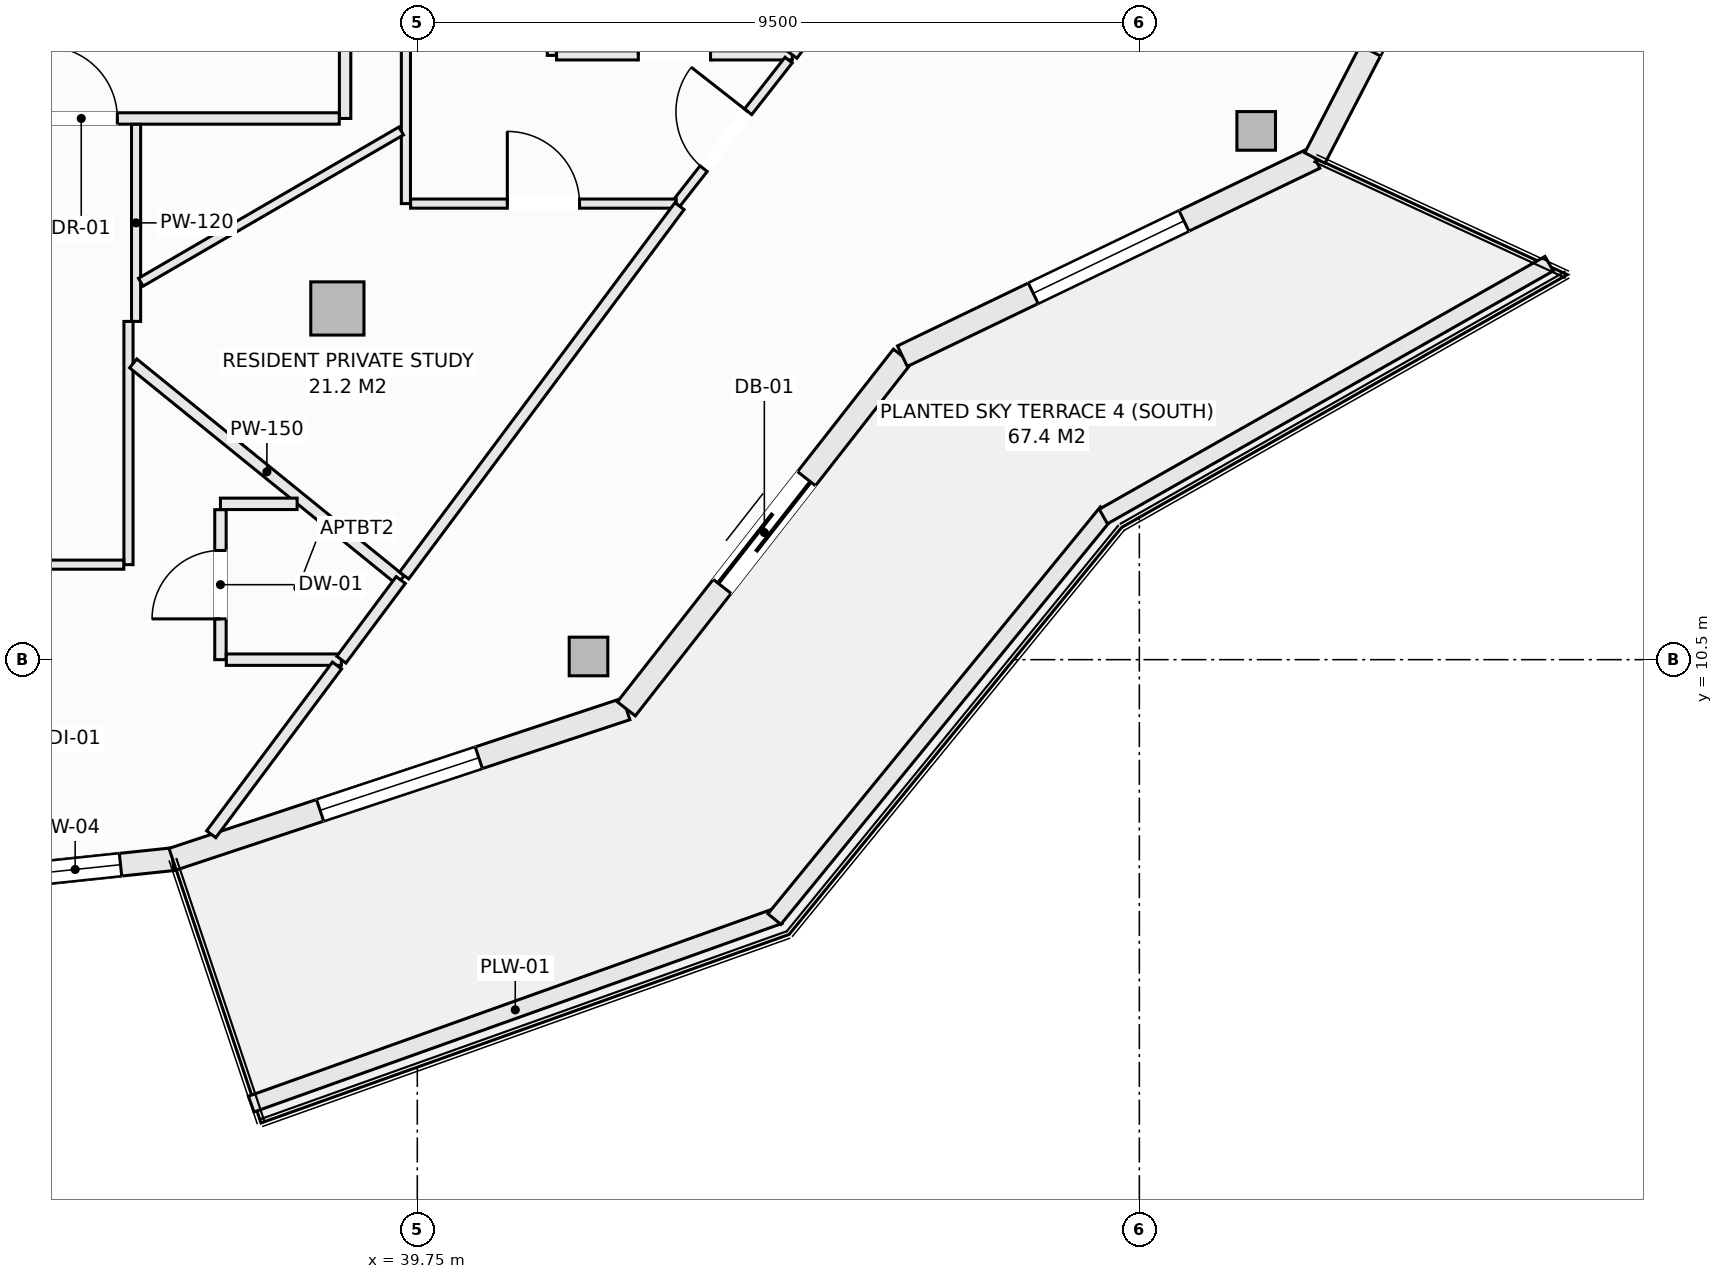
"""IFC4 building model, lengths in metres.
Left out: names, types, materials, properties, quantities, classifications, styles, units other than length and angle.
Written with IfcOpenShell. Run it as: python <this file> out.ifc"""

import sys

from ifc_helpers import new_model, si_unit, direction, frame, frame_2d, origin, origin_2d, place, context, subcontext, project, spatial, rectangle, hollow_rectangle, extrude, element, fill, save


model = new_model("IFC4")
c1 = context("Model", 3, precision=1e-05, world=origin(), true_north=direction((0.0, 1.0)))
c2 = subcontext(c1, "Body", "Model", "MODEL_VIEW")
j1 = project(units=[si_unit("LENGTHUNIT", "METRE"), si_unit("PLANEANGLEUNIT", "RADIAN")], contexts=[c1])
p1 = place(None, origin())
s1 = spatial("IfcSite", under=j1, at=p1, CompositionType="ELEMENT")
p2 = place(p1, origin())
s2 = spatial("IfcBuilding", under=s1, at=p2, CompositionType="ELEMENT")
p3 = place(p2, frame((0.0, 0.0, 199.7)))
s3 = spatial("IfcBuildingStorey", under=s2, at=p3, CompositionType="ELEMENT", Elevation=199.7)
for number, where, z_axis, x_axis in (
    (1, (42.003, 10.542, -0.27), (0.0, 0.0, 1.0), (1.0, 0.0, 0.0)),
    (2, (50.787, 17.456, -0.27), (0.0, 0.0, 1.0), (1.0, 0.0, 0.0)),
):
    element("IfcColumn", number, at=place(p3, frame(where, z_axis=z_axis, x_axis=x_axis)), inside=s3, PredefinedType="COLUMN", context=c2, shape_type="SweptSolid", body=[
        extrude(hollow_rectangle(XDim=0.508, YDim=0.508, WallThickness=0.019, at=origin_2d()), origin(), (0.0, 0.0, 1.0), 3.3),
    ])
p4 = place(p3, frame((38.698, 15.121, -0.27), z_axis=(0.0, 0.0, 1.0), x_axis=(1.0, 0.0, 0.0)))
e3 = element("IfcColumn", 3, at=p4, inside=s3, PredefinedType="COLUMN", context=c2, shape_type="SweptSolid", body=[
    extrude(rectangle(XDim=0.7, YDim=0.7, at=origin_2d()), origin(), (0.0, 0.0, 1.0), 3.3),
])
p5 = place(p3, frame((30.125, 7.2, 0.0), z_axis=(0.0, 0.0, 1.0), x_axis=(0.994497142298, 0.104763705363, 0.0)))
e4 = element("IfcWall", 4, at=p5, inside=s3, PredefinedType="SOLIDWALL", context=c2, shape_type="SweptSolid", body=[
    extrude(rectangle(XDim=6.441, YDim=0.3, at=frame_2d((3.221, 0.0))), origin(), (0.0, 0.0, 1.0), 2.605),
])
p6 = place(p5, frame((3.085, 0.0, 0.72)))
e5 = element("IfcOpeningElement", 5, at=p6, cuts=e4, PredefinedType="OPENING", context=c2, shape_type="SweptSolid", body=[
    extrude(rectangle(XDim=1.2, YDim=1.65, at=frame_2d((0.6, 0.825))), frame((0.0, 0.16, 0.0), z_axis=(0.0, -1.0, 0.0), x_axis=(1.0, 0.0, 0.0)), (0.0, 0.0, 1.0), 0.32),
])
p7 = place(p5, frame((4.552, 0.0, 0.72)))
e6 = element("IfcOpeningElement", 6, at=p7, cuts=e4, PredefinedType="OPENING", context=c2, shape_type="SweptSolid", body=[
    extrude(rectangle(XDim=1.2, YDim=1.65, at=frame_2d((0.6, 0.825))), frame((0.0, 0.16, 0.0), z_axis=(0.0, -1.0, 0.0), x_axis=(1.0, 0.0, 0.0)), (0.0, 0.0, 1.0), 0.32),
])
p8 = place(p3, frame((36.531, 7.875, 0.0), z_axis=(0.0, 0.0, 1.0), x_axis=(0.949240877604, 0.314550085495, 0.0)))
e7 = element("IfcWall", 7, at=p8, inside=s3, PredefinedType="SOLIDWALL", context=c2, shape_type="SweptSolid", body=[
    extrude(rectangle(XDim=6.288, YDim=0.3, at=frame_2d((3.144, 0.0))), origin(), (0.0, 0.0, 1.0), 2.605),
])
p9 = place(p8, frame((2.044, 0.0, 0.72)))
e8 = element("IfcOpeningElement", 8, at=p9, cuts=e7, PredefinedType="OPENING", context=c2, shape_type="SweptSolid", body=[
    extrude(rectangle(XDim=2.2, YDim=1.65, at=frame_2d((1.1, 0.825))), frame((0.0, 0.16, 0.0), z_axis=(0.0, -1.0, 0.0), x_axis=(1.0, 0.0, 0.0)), (0.0, 0.0, 1.0), 0.32),
])
p10 = place(p3, frame((42.5, 9.853, 0.0), z_axis=(0.0, 0.0, 1.0), x_axis=(0.616450126935, 0.787393955401, 0.0)))
e9 = element("IfcWall", 9, at=p10, inside=s3, PredefinedType="SOLIDWALL", context=c2, shape_type="SweptSolid", body=[
    extrude(rectangle(XDim=5.893, YDim=0.3, at=frame_2d((2.946, 0.0))), origin(), (0.0, 0.0, 1.0), 2.605),
])
p11 = place(p10, frame((2.046, 0.0, 0.0)))
e10 = element("IfcOpeningElement", 10, at=p11, cuts=e9, PredefinedType="OPENING", context=c2, shape_type="SweptSolid", body=[
    extrude(rectangle(XDim=1.8, YDim=2.25, at=frame_2d((0.9, 1.125))), frame((0.0, 0.16, 0.0), z_axis=(0.0, -1.0, 0.0), x_axis=(1.0, 0.0, 0.0)), (0.0, 0.0, 1.0), 0.32),
])
p12 = place(p3, frame((46.133, 14.493, 0.0), z_axis=(0.0, 0.0, 1.0), x_axis=(0.901348331142, 0.433094892545, 0.0)))
e11 = element("IfcWall", 11, at=p12, inside=s3, PredefinedType="SOLIDWALL", context=c2, shape_type="SweptSolid", body=[
    extrude(rectangle(XDim=6.021, YDim=0.3, at=frame_2d((3.01, 0.0))), origin(), (0.0, 0.0, 1.0), 2.605),
])
p13 = place(p12, frame((1.91, 0.0, 0.72)))
e12 = element("IfcOpeningElement", 12, at=p13, cuts=e11, PredefinedType="OPENING", context=c2, shape_type="SweptSolid", body=[
    extrude(rectangle(XDim=2.2, YDim=1.65, at=frame_2d((1.1, 0.825))), frame((0.0, 0.16, 0.0), z_axis=(0.0, -1.0, 0.0), x_axis=(1.0, 0.0, 0.0)), (0.0, 0.0, 1.0), 0.32),
])
p14 = place(p3, frame((51.559, 17.1, 0.0), z_axis=(0.0, 0.0, 1.0), x_axis=(0.459808219482, 0.888018243786, 0.0)))
e13 = element("IfcWall", 13, at=p14, inside=s3, PredefinedType="SOLIDWALL", context=c2, shape_type="SweptSolid", body=[
    extrude(rectangle(XDim=5.378, YDim=0.3, at=frame_2d((2.689, 0.0))), origin(), (0.0, 0.0, 1.0), 2.605),
])
p15 = place(p14, frame((1.589, 0.0, 0.72)))
e14 = element("IfcOpeningElement", 14, at=p15, cuts=e13, PredefinedType="OPENING", context=c2, shape_type="SweptSolid", body=[
    extrude(rectangle(XDim=2.2, YDim=1.65, at=frame_2d((1.1, 0.825))), frame((0.0, 0.16, 0.0), z_axis=(0.0, -1.0, 0.0), x_axis=(1.0, 0.0, 0.0)), (0.0, 0.0, 1.0), 0.32),
])
p16 = place(p3, frame((37.565, 4.653, 0.0), z_axis=(0.0, 0.0, 1.0), x_axis=(0.941780086523, 0.336229488042, 0.0)))
e15 = element("IfcWall", 15, at=p16, inside=s3, PredefinedType="PARAPET", context=c2, shape_type="SweptSolid", body=[
    extrude(rectangle(XDim=7.378, YDim=0.22, at=frame_2d((3.689, 0.0))), origin(), (0.0, 0.0, 1.0), 0.52),
])
p17 = place(p3, frame((44.448, 7.087, 0.0), z_axis=(0.0, 0.0, 1.0), x_axis=(0.632697312147, 0.774399193699, 0.0)))
e16 = element("IfcWall", 16, at=p17, inside=s3, PredefinedType="PARAPET", context=c2, shape_type="SweptSolid", body=[
    extrude(rectangle(XDim=6.914, YDim=0.22, at=frame_2d((3.457, 0.0))), origin(), (0.0, 0.0, 1.0), 0.52),
])
p18 = place(p3, frame((48.776, 12.383, 0.0), z_axis=(0.0, 0.0, 1.0), x_axis=(0.869860619267, 0.493297580623, 0.0)))
e17 = element("IfcWall", 17, at=p18, inside=s3, PredefinedType="PARAPET", context=c2, shape_type="SweptSolid", body=[
    extrude(rectangle(XDim=6.743, YDim=0.22, at=frame_2d((3.371, 0.0))), origin(), (0.0, 0.0, 1.0), 0.52),
])
p19 = place(p3, frame((38.8, 17.62, 0.0), z_axis=(0.0, 0.0, 1.0), x_axis=(0.0, 1.0, 0.0)))
e18 = element("IfcWall", 18, at=p19, inside=s3, PredefinedType="PARTITIONING", context=c2, shape_type="SweptSolid", body=[
    extrude(rectangle(XDim=2.18, YDim=0.15, at=frame_2d((1.09, 0.0))), origin(), (0.0, 0.0, 1.0), 3.03),
])
p20 = place(p3, frame((34.477, 17.62, 0.0), z_axis=(0.0, 0.0, 1.0), x_axis=(1.0, 0.0, 0.0)))
e19 = element("IfcWall", 19, at=p20, inside=s3, PredefinedType="PARTITIONING", context=c2, shape_type="SweptSolid", body=[
    extrude(rectangle(XDim=4.246, YDim=0.15, at=frame_2d((2.123, 0.0))), origin(), (0.0, 0.0, 1.0), 3.03),
])
p21 = place(p20, frame((0.376, 0.0, 0.0)))
e20 = element("IfcOpeningElement", 20, at=p21, cuts=e19, PredefinedType="OPENING", context=c2, shape_type="SweptSolid", body=[
    extrude(rectangle(XDim=0.95, YDim=2.1, at=frame_2d((0.475, 1.05))), frame((0.0, 0.085, 0.0), z_axis=(0.0, -1.0, 0.0), x_axis=(1.0, 0.0, 0.0)), (0.0, 0.0, 1.0), 0.17),
])
p22 = place(p3, frame((39.6, 16.5, 0.0), z_axis=(0.0, 0.0, 1.0), x_axis=(0.0, 1.0, 0.0)))
e21 = element("IfcWall", 21, at=p22, inside=s3, PredefinedType="PARTITIONING", context=c2, shape_type="SweptSolid", body=[
    extrude(rectangle(XDim=6.52, YDim=0.12, at=frame_2d((3.26, 0.0))), origin(), (0.0, 0.0, 1.0), 2.478),
])
p23 = place(p3, frame((41.52, 18.45, 0.0), z_axis=(0.0, 0.0, 1.0), x_axis=(0.0, 1.0, 0.0)))
e22 = element("IfcWall", 22, at=p23, inside=s3, PredefinedType="PARTITIONING", context=c2, shape_type="SweptSolid", body=[
    extrude(rectangle(XDim=2.357, YDim=0.12, at=frame_2d((1.178, 0.0))), origin(), (0.0, 0.0, 1.0), 3.03),
])
p24 = place(p3, frame((41.582, 18.45, 0.0), z_axis=(0.0, 0.0, 1.0), x_axis=(1.0, 0.0, 0.0)))
e23 = element("IfcWall", 23, at=p24, inside=s3, PredefinedType="PARTITIONING", context=c2, shape_type="SweptSolid", body=[
    extrude(rectangle(XDim=3.102, YDim=0.12, at=frame_2d((1.551, 0.0))), origin(), (0.0, 0.0, 1.0), 3.03),
])
p25 = place(p24, frame((1.076, 0.0, 0.0)))
e24 = element("IfcOpeningElement", 24, at=p25, cuts=e23, PredefinedType="OPENING", context=c2, shape_type="SweptSolid", body=[
    extrude(rectangle(XDim=0.95, YDim=2.1, at=frame_2d((0.475, 1.05))), frame((0.0, 0.07, 0.0), z_axis=(0.0, -1.0, 0.0), x_axis=(1.0, 0.0, 0.0)), (0.0, 0.0, 1.0), 0.14),
])
p26 = place(p3, frame((43.157, 16.5, 0.0), z_axis=(0.0, 0.0, 1.0), x_axis=(0.616566276607, 0.787303008092, 0.0)))
e25 = element("IfcWall", 25, at=p26, inside=s3, PredefinedType="PARTITIONING", context=c2, shape_type="SweptSolid", body=[
    extrude(rectangle(XDim=2.398, YDim=0.12, at=frame_2d((1.199, 0.0))), origin(), (0.0, 0.0, 1.0), 3.03),
])
p27 = place(p26, frame((0.584, 0.0, 0.0)))
e26 = element("IfcOpeningElement", 26, at=p27, cuts=e25, PredefinedType="OPENING", context=c2, shape_type="SweptSolid", body=[
    extrude(rectangle(XDim=0.95, YDim=2.1, at=frame_2d((0.475, 1.05))), frame((0.0, 0.07, 0.0), z_axis=(0.0, -1.0, 0.0), x_axis=(1.0, 0.0, 0.0)), (0.0, 0.0, 1.0), 0.14),
])
p28 = place(p3, frame((39.662, 16.5, 0.0), z_axis=(0.0, 0.0, 1.0), x_axis=(1.0, 0.0, 0.0)))
e27 = element("IfcWall", 27, at=p28, inside=s3, PredefinedType="PARTITIONING", context=c2, shape_type="SweptSolid", body=[
    extrude(rectangle(XDim=3.495, YDim=0.12, at=frame_2d((1.748, 0.0))), origin(), (0.0, 0.0, 1.0), 2.712),
])
p29 = place(p28, frame((1.272, 0.0, 0.0)))
e28 = element("IfcOpeningElement", 28, at=p29, cuts=e27, PredefinedType="OPENING", context=c2, shape_type="SweptSolid", body=[
    extrude(rectangle(XDim=0.95, YDim=2.1, at=frame_2d((0.475, 1.05))), frame((0.0, 0.07, 0.0), z_axis=(0.0, -1.0, 0.0), x_axis=(1.0, 0.0, 0.0)), (0.0, 0.0, 1.0), 0.14),
])
p30 = place(p3, frame((36.05, 14.95, 0.0), z_axis=(0.0, 0.0, 1.0), x_axis=(0.0, 1.0, 0.0)))
e29 = element("IfcWall", 29, at=p30, inside=s3, PredefinedType="PARTITIONING", context=c2, shape_type="SweptSolid", body=[
    extrude(rectangle(XDim=2.593, YDim=0.12, at=frame_2d((1.296, 0.0))), origin(), (0.0, 0.0, 1.0), 3.03),
])
p31 = place(p3, frame((35.95, 11.75, 0.0), z_axis=(0.0, 0.0, 1.0), x_axis=(0.0, 1.0, 0.0)))
e30 = element("IfcWall", 30, at=p31, inside=s3, PredefinedType="PARTITIONING", context=c2, shape_type="SweptSolid", body=[
    extrude(rectangle(XDim=3.2, YDim=0.12, at=frame_2d((1.6, 0.0))), origin(), (0.0, 0.0, 1.0), 3.03),
])
p32 = place(p3, frame((31.766, 11.75, 0.0), z_axis=(0.0, 0.0, 1.0), x_axis=(1.0, 0.0, 0.0)))
e31 = element("IfcWall", 31, at=p32, inside=s3, PredefinedType="PARTITIONING", context=c2, shape_type="SweptSolid", body=[
    extrude(rectangle(XDim=4.122, YDim=0.12, at=frame_2d((2.061, 0.0))), origin(), (0.0, 0.0, 1.0), 3.03),
])
p33 = place(p32, frame((1.586, 0.0, 0.0)))
e32 = element("IfcOpeningElement", 32, at=p33, cuts=e31, PredefinedType="OPENING", context=c2, shape_type="SweptSolid", body=[
    extrude(rectangle(XDim=0.95, YDim=2.1, at=frame_2d((0.475, 1.05))), frame((0.0, 0.07, 0.0), z_axis=(0.0, -1.0, 0.0), x_axis=(1.0, 0.0, 0.0)), (0.0, 0.0, 1.0), 0.14),
])
p34 = place(p3, frame((36.112, 15.466, 0.0), z_axis=(0.0, 0.0, 1.0), x_axis=(0.864713842027, 0.502264841898, 0.0)))
e33 = element("IfcWall", 33, at=p34, inside=s3, PredefinedType="PARTITIONING", context=c2, shape_type="SweptSolid", body=[
    extrude(rectangle(XDim=3.962, YDim=0.12, at=frame_2d((1.981, 0.0))), origin(), (0.0, 0.0, 1.0), 2.478),
])
p35 = place(p3, frame((36.012, 14.398, 0.0), z_axis=(0.0, 0.0, 1.0), x_axis=(0.776797795694, -0.629750096947, 0.0)))
e34 = element("IfcWall", 34, at=p35, inside=s3, PredefinedType="PARTITIONING", context=c2, shape_type="SweptSolid", body=[
    extrude(rectangle(XDim=4.529, YDim=0.15, at=frame_2d((2.265, 0.0))), origin(), (0.0, 0.0, 1.0), 3.03),
])
p36 = place(p3, frame((37.16, 12.55, 0.0), z_axis=(0.0, 0.0, 1.0), x_axis=(1.0, 0.0, 0.0)))
e35 = element("IfcWall", 35, at=p36, inside=s3, PredefinedType="PARTITIONING", context=c2, shape_type="SweptSolid", body=[
    extrude(rectangle(XDim=1.009, YDim=0.15, at=frame_2d((0.504, 0.0))), origin(), (0.0, 0.0, 1.0), 3.03),
])
p37 = place(p3, frame((37.16, 10.5, 0.0), z_axis=(0.0, 0.0, 1.0), x_axis=(0.0, 1.0, 0.0)))
e36 = element("IfcWall", 36, at=p37, inside=s3, PredefinedType="PARTITIONING", context=c2, shape_type="SweptSolid", body=[
    extrude(rectangle(XDim=1.973, YDim=0.15, at=frame_2d((0.986, 0.0))), origin(), (0.0, 0.0, 1.0), 3.03),
])
p38 = place(p37, frame((0.537, 0.0, 0.0)))
e37 = element("IfcOpeningElement", 37, at=p38, cuts=e36, PredefinedType="OPENING", context=c2, shape_type="SweptSolid", body=[
    extrude(rectangle(XDim=0.9, YDim=2.1, at=frame_2d((0.45, 1.05))), frame((0.0, 0.085, 0.0), z_axis=(0.0, -1.0, 0.0), x_axis=(1.0, 0.0, 0.0)), (0.0, 0.0, 1.0), 0.17),
])
p39 = place(p3, frame((37.237, 10.5, 0.0), z_axis=(0.0, 0.0, 1.0), x_axis=(1.0, 0.0, 0.0)))
e38 = element("IfcWall", 38, at=p39, inside=s3, PredefinedType="PARTITIONING", context=c2, shape_type="SweptSolid", body=[
    extrude(rectangle(XDim=1.514, YDim=0.15, at=frame_2d((0.757, 0.0))), origin(), (0.0, 0.0, 1.0), 3.03),
])
p40 = place(p3, frame((37.038, 8.203, 0.0), z_axis=(0.0, 0.0, 1.0), x_axis=(0.59771249227, 0.801710531666, 0.0)))
e39 = element("IfcWall", 39, at=p40, inside=s3, PredefinedType="PARTITIONING", context=c2, shape_type="SweptSolid", body=[
    extrude(rectangle(XDim=2.769, YDim=0.15, at=frame_2d((1.385, 0.0))), origin(), (0.0, 0.0, 1.0), 3.03),
])
p41 = place(p3, frame((38.751, 10.5, 0.0), z_axis=(0.0, 0.0, 1.0), x_axis=(0.597815740709, 0.801633544807, 0.0)))
e40 = element("IfcWall", 40, at=p41, inside=s3, PredefinedType="PARTITIONING", context=c2, shape_type="SweptSolid", body=[
    extrude(rectangle(XDim=1.307, YDim=0.15, at=frame_2d((0.653, 0.0))), origin(), (0.0, 0.0, 1.0), 3.03),
])
p42 = place(p3, frame((39.576, 11.607, 0.0), z_axis=(0.0, 0.0, 1.0), x_axis=(0.597735703185, 0.801693226326, 0.0)))
e41 = element("IfcWall", 41, at=p42, inside=s3, PredefinedType="PARTITIONING", context=c2, shape_type="SweptSolid", body=[
    extrude(rectangle(XDim=6.062, YDim=0.15, at=frame_2d((3.031, 0.0))), origin(), (0.0, 0.0, 1.0), 3.03),
])
p43 = place(p3, frame((44.684, 18.457, 0.0), z_axis=(0.0, 0.0, 1.0), x_axis=(0.597750794318, 0.801681974284, 0.0)))
e42 = element("IfcWall", 42, at=p43, inside=s3, PredefinedType="PARTITIONING", context=c2, shape_type="SweptSolid", body=[
    extrude(rectangle(XDim=15.682, YDim=0.15, at=frame_2d((7.841, 0.0))), origin(), (0.0, 0.0, 1.0), 3.03),
])
p44 = place(p9, origin())
e43 = element("IfcWindow", 43, at=p44, inside=s3, PartitioningType="SINGLE_PANEL", PredefinedType="WINDOW", context=c2, shape_type="SweptSolid", body=[
    extrude(rectangle(XDim=2.2, YDim=1.65, at=frame_2d((1.1, 0.825))), frame((0.0, 0.03, 0.0), z_axis=(0.0, -1.0, 0.0), x_axis=(1.0, 0.0, 0.0)), (0.0, 0.0, 1.0), 0.06),
])
fill(e8, e43)
p45 = place(p11, frame((1.8, 0.0, 0.0), z_axis=(0.0, 0.0, 1.0), x_axis=(-1.0, 0.0, 0.0)))
e44 = element("IfcDoor", 44, at=p45, inside=s3, OperationType="SLIDING_TO_LEFT", PredefinedType="DOOR", context=c2, shape_type="SweptSolid", body=[
    extrude(rectangle(XDim=1.8, YDim=2.25, at=frame_2d((0.9, 1.125))), frame((0.0, 0.025, 0.0), z_axis=(0.0, -1.0, 0.0), x_axis=(1.0, 0.0, 0.0)), (0.0, 0.0, 1.0), 0.05),
])
fill(e10, e44)
p46 = place(p13, origin())
e45 = element("IfcWindow", 45, at=p46, inside=s3, PartitioningType="SINGLE_PANEL", PredefinedType="WINDOW", context=c2, shape_type="SweptSolid", body=[
    extrude(rectangle(XDim=2.2, YDim=1.65, at=frame_2d((1.1, 0.825))), frame((0.0, 0.03, 0.0), z_axis=(0.0, -1.0, 0.0), x_axis=(1.0, 0.0, 0.0)), (0.0, 0.0, 1.0), 0.06),
])
fill(e12, e45)
p47 = place(p21, origin())
e46 = element("IfcDoor", 46, at=p47, inside=s3, OperationType="SINGLE_SWING_LEFT", PredefinedType="DOOR", context=c2, shape_type="SweptSolid", body=[
    extrude(rectangle(XDim=0.95, YDim=2.1, at=frame_2d((0.475, 1.05))), frame((0.0, 0.025, 0.0), z_axis=(0.0, -1.0, 0.0), x_axis=(1.0, 0.0, 0.0)), (0.0, 0.0, 1.0), 0.05),
])
fill(e20, e46)
p48 = place(p29, origin())
e47 = element("IfcDoor", 47, at=p48, inside=s3, OperationType="SINGLE_SWING_LEFT", PredefinedType="DOOR", context=c2, shape_type="SweptSolid", body=[
    extrude(rectangle(XDim=0.95, YDim=2.1, at=frame_2d((0.475, 1.05))), frame((0.0, 0.025, 0.0), z_axis=(0.0, -1.0, 0.0), x_axis=(1.0, 0.0, 0.0)), (0.0, 0.0, 1.0), 0.05),
])
fill(e28, e47)
p49 = place(p27, origin())
e48 = element("IfcDoor", 48, at=p49, inside=s3, OperationType="SINGLE_SWING_RIGHT", PredefinedType="DOOR", context=c2, shape_type="SweptSolid", body=[
    extrude(rectangle(XDim=0.95, YDim=2.1, at=frame_2d((0.475, 1.05))), frame((0.0, 0.025, 0.0), z_axis=(0.0, -1.0, 0.0), x_axis=(1.0, 0.0, 0.0)), (0.0, 0.0, 1.0), 0.05),
])
fill(e26, e48)
p50 = place(p25, origin())
e49 = element("IfcDoor", 49, at=p50, inside=s3, OperationType="SINGLE_SWING_LEFT", PredefinedType="DOOR", context=c2, shape_type="SweptSolid", body=[
    extrude(rectangle(XDim=0.95, YDim=2.1, at=frame_2d((0.475, 1.05))), frame((0.0, 0.025, 0.0), z_axis=(0.0, -1.0, 0.0), x_axis=(1.0, 0.0, 0.0)), (0.0, 0.0, 1.0), 0.05),
])
fill(e24, e49)
p51 = place(p38, origin())
e50 = element("IfcDoor", 50, at=p51, inside=s3, OperationType="SINGLE_SWING_LEFT", PredefinedType="DOOR", context=c2, shape_type="SweptSolid", body=[
    extrude(rectangle(XDim=0.9, YDim=2.1, at=frame_2d((0.45, 1.05))), frame((0.0, 0.025, 0.0), z_axis=(0.0, -1.0, 0.0), x_axis=(1.0, 0.0, 0.0)), (0.0, 0.0, 1.0), 0.05),
])
fill(e37, e50)
p52 = place(p7, origin())
e51 = element("IfcWindow", 51, at=p52, inside=s3, PartitioningType="SINGLE_PANEL", PredefinedType="WINDOW", context=c2, shape_type="SweptSolid", body=[
    extrude(rectangle(XDim=1.2, YDim=1.65, at=frame_2d((0.6, 0.825))), frame((0.0, 0.03, 0.0), z_axis=(0.0, -1.0, 0.0), x_axis=(1.0, 0.0, 0.0)), (0.0, 0.0, 1.0), 0.06),
])
fill(e6, e51)
save(model, sys.argv[1])
